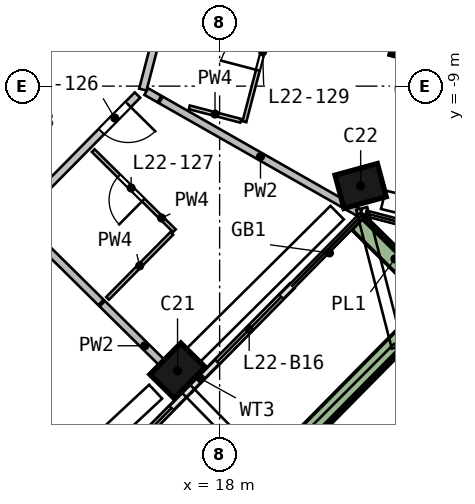
"""IFC4 building model, lengths in metres.
Left out: names, types, materials, properties, quantities, classifications, styles, units other than length and angle.
Written with IfcOpenShell. Run it as: python <this file> out.ifc"""

import sys

from ifc_helpers import new_model, si_unit, direction, frame, frame_2d, origin, origin_2d, place, context, subcontext, project, spatial, rectangle, extrude, element, fill, save


model = new_model("IFC4")
c1 = context("Model", 3, precision=1e-05, world=origin(), true_north=direction((0.0, 1.0)))
c2 = subcontext(c1, "Body", "Model", "MODEL_VIEW")
j1 = project(units=[si_unit("LENGTHUNIT", "METRE"), si_unit("PLANEANGLEUNIT", "RADIAN")], contexts=[c1])
p1 = place(None, origin())
s1 = spatial("IfcSite", under=j1, at=p1, CompositionType="ELEMENT")
p2 = place(p1, origin())
s2 = spatial("IfcBuilding", under=s1, at=p2, CompositionType="ELEMENT")
p3 = place(p2, frame((0.0, 0.0, 96.5)))
s3 = spatial("IfcBuildingStorey", under=s2, at=p3, CompositionType="ELEMENT", Elevation=96.5)
p4 = place(p3, frame((16.798, -16.588, 0.0), z_axis=(0.078255888, 0.080537401, 0.993674868), x_axis=(0.698489901, 0.706754906, -0.112291409)))
e1 = element("IfcColumn", 1, at=p4, inside=s3, PredefinedType="COLUMN", context=c2, shape_type="SweptSolid", body=[
    extrude(rectangle(XDim=1.15, YDim=0.9, at=origin_2d()), origin(), (0.0, 0.0, 1.0), 3.21),
])
p5 = place(p3, frame((21.644, -11.752, 0.0), z_axis=(0.055029299, 0.103445961, 0.99311163), x_axis=(-0.962932337, -0.257549594, 0.080184296)))
e2 = element("IfcColumn", 2, at=p5, inside=s3, PredefinedType="COLUMN", context=c2, shape_type="SweptSolid", body=[
    extrude(rectangle(XDim=1.15, YDim=0.9, at=origin_2d()), origin(), (0.0, 0.0, 1.0), 3.212),
])
p6 = place(p3, frame((22.989, -7.976, 0.0), z_axis=(0.036946061, 0.109621851, 0.993286484), x_axis=(0.967389364, -0.253166219, -0.008042671)))
e3 = element("IfcColumn", 3, at=p6, inside=s3, PredefinedType="COLUMN", context=c2, shape_type="SweptSolid", body=[
    extrude(rectangle(XDim=0.9, YDim=0.9, at=origin_2d()), origin(), (0.0, 0.0, 1.0), 3.211),
])
p7 = place(p3, frame((5.516, -13.717, 0.0), z_axis=(0.0, 0.0, 1.0), x_axis=(0.707106781, 0.707106781, 0.0)))
e4 = element("IfcWall", 4, at=p7, inside=s3, PredefinedType="SHEAR", context=c2, shape_type="SweptSolid", body=[
    extrude(rectangle(XDim=11.598, YDim=0.8, at=frame_2d((5.799, 0.0))), origin(), (0.0, 0.0, 1.0), 3.5),
])
p8 = place(p7, frame((2.099, 0.0, 0.0)))
e5 = element("IfcOpeningElement", 5, at=p8, cuts=e4, PredefinedType="OPENING", context=c2, shape_type="SweptSolid", body=[
    extrude(rectangle(XDim=1.2, YDim=2.1, at=frame_2d((0.6, 1.05))), frame((0.0, 0.41, 0.0), z_axis=(0.0, -1.0, 0.0), x_axis=(1.0, 0.0, 0.0)), (0.0, 0.0, 1.0), 0.82),
])
p9 = place(p3, frame((14.766, -19.465, 0.0), z_axis=(0.0, 0.0, 1.0), x_axis=(0.702631444, 0.711553971, 0.0)))
e6 = element("IfcWall", 6, at=p9, inside=s3, PredefinedType="SOLIDWALL", context=c2, shape_type="SweptSolid", body=[
    extrude(rectangle(XDim=3.475, YDim=0.15, at=frame_2d((1.738, 0.0))), origin(), (0.0, 0.0, 1.0), 2.425),
])
p10 = place(p9, frame((0.4, 0.0, 0.0)))
e7 = element("IfcOpeningElement", 7, at=p10, cuts=e6, PredefinedType="OPENING", context=c2, shape_type="SweptSolid", body=[
    extrude(rectangle(XDim=2.4, YDim=2.4, at=frame_2d((1.2, 1.2))), frame((0.0, 0.085, 0.0), z_axis=(0.0, -1.0, 0.0), x_axis=(1.0, 0.0, 0.0)), (0.0, 0.0, 1.0), 0.17),
])
p11 = place(p3, frame((17.207, -16.992, 0.0), z_axis=(0.0, 0.0, 1.0), x_axis=(0.702669036, 0.711516848, 0.0)))
e8 = element("IfcWall", 8, at=p11, inside=s3, PredefinedType="SOLIDWALL", context=c2, shape_type="SweptSolid", body=[
    extrude(rectangle(XDim=3.835, YDim=0.15, at=frame_2d((1.918, 0.0))), origin(), (0.0, 0.0, 1.0), 2.425),
])
p12 = place(p11, frame((1.035, 0.0, 0.0)))
e9 = element("IfcOpeningElement", 9, at=p12, cuts=e8, PredefinedType="OPENING", context=c2, shape_type="SweptSolid", body=[
    extrude(rectangle(XDim=2.4, YDim=2.4, at=frame_2d((1.2, 1.2))), frame((0.0, 0.085, 0.0), z_axis=(0.0, -1.0, 0.0), x_axis=(1.0, 0.0, 0.0)), (0.0, 0.0, 1.0), 0.17),
])
p13 = place(p3, frame((14.284, -24.258, 0.0), z_axis=(0.0, 0.0, 1.0), x_axis=(0.702654229, 0.711531471, 0.0)))
e10 = element("IfcWall", 10, at=p13, inside=s3, PredefinedType="SOLIDWALL", context=c2, shape_type="SweptSolid", body=[
    extrude(rectangle(XDim=13.723, YDim=0.5, at=frame_2d((6.862, 0.0))), origin(), (0.0, 0.0, 1.0), 0.7),
])
p14 = place(p3, frame((23.573, -14.495, 0.0), z_axis=(0.0, 0.0, 1.0), x_axis=(-0.71156988, 0.702615333, 0.0)))
e11 = element("IfcWall", 11, at=p14, inside=s3, PredefinedType="SOLIDWALL", context=c2, shape_type="SweptSolid", body=[
    extrude(rectangle(XDim=2.699, YDim=0.5, at=frame_2d((1.35, 0.0))), origin(), (0.0, 0.0, 1.0), 0.7),
])
p15 = place(p3, frame((15.839, -9.235, 0.0), z_axis=(0.0, 0.0, 1.0), x_axis=(-0.702660587, -0.711525192, 0.0)))
e12 = element("IfcWall", 12, at=p15, inside=s3, PredefinedType="SOLIDWALL", context=c2, shape_type="SweptSolid", body=[
    extrude(rectangle(XDim=9.116, YDim=0.2, at=frame_2d((4.558, 0.0))), origin(), (0.0, 0.0, 1.0), 3.19),
])
p16 = place(p15, frame((0.35, 0.0, 0.0)))
e13 = element("IfcOpeningElement", 13, at=p16, cuts=e12, PredefinedType="OPENING", context=c2, shape_type="SweptSolid", body=[
    extrude(rectangle(XDim=1.0, YDim=2.1, at=frame_2d((0.5, 1.05))), frame((0.0, 0.11, 0.0), z_axis=(0.0, -1.0, 0.0), x_axis=(1.0, 0.0, 0.0)), (0.0, 0.0, 1.0), 0.22),
])
p17 = place(p3, frame((15.979, -9.092, 0.0), z_axis=(0.0, 0.0, 1.0), x_axis=(0.25277502, 0.967525084, 0.0)))
e14 = element("IfcWall", 14, at=p17, inside=s3, PredefinedType="SOLIDWALL", context=c2, shape_type="SweptSolid", body=[
    extrude(rectangle(XDim=3.659, YDim=0.2, at=frame_2d((1.829, 0.0))), origin(), (0.0, 0.0, 1.0), 3.19),
])
p18 = place(p3, frame((12.954, -12.792, 0.0), z_axis=(0.0, 0.0, 1.0), x_axis=(0.711560793, -0.702624535, 0.0)))
e15 = element("IfcWall", 15, at=p18, inside=s3, PredefinedType="SOLIDWALL", context=c2, shape_type="SweptSolid", body=[
    extrude(rectangle(XDim=2.705, YDim=0.2, at=frame_2d((1.352, 0.0))), origin(), (0.0, 0.0, 1.0), 3.19),
])
p19 = place(p3, frame((14.911, -14.725, 0.0), z_axis=(0.0, 0.0, 1.0), x_axis=(0.711546698, -0.702638809, 0.0)))
e16 = element("IfcWall", 16, at=p19, inside=s3, PredefinedType="SOLIDWALL", context=c2, shape_type="SweptSolid", body=[
    extrude(rectangle(XDim=3.152, YDim=0.2, at=frame_2d((1.576, 0.0))), origin(), (0.0, 0.0, 1.0), 3.19),
])
p20 = place(p3, frame((16.069, -9.143, 0.0), z_axis=(0.0, 0.0, 1.0), x_axis=(0.869064731, -0.494698386, 0.0)))
e17 = element("IfcWall", 17, at=p20, inside=s3, PredefinedType="SOLIDWALL", context=c2, shape_type="SweptSolid", body=[
    extrude(rectangle(XDim=0.402, YDim=0.2, at=frame_2d((0.201, 0.0))), origin(), (0.0, 0.0, 1.0), 3.19),
])
p21 = place(p3, frame((16.453, -9.362, 0.0), z_axis=(0.0, 0.0, 1.0), x_axis=(0.869145541, -0.494556396, 0.0)))
e18 = element("IfcWall", 18, at=p21, inside=s3, PredefinedType="SOLIDWALL", context=c2, shape_type="SweptSolid", body=[
    extrude(rectangle(XDim=6.034, YDim=0.2, at=frame_2d((3.017, 0.0))), origin(), (0.0, 0.0, 1.0), 3.19),
])
p22 = place(p3, frame((16.81, -12.805, 0.0), z_axis=(0.0, 0.0, 1.0), x_axis=(-0.711568401, 0.702616831, 0.0)))
e19 = element("IfcWall", 19, at=p22, inside=s3, PredefinedType="PARTITIONING", context=c2, shape_type="SweptSolid", body=[
    extrude(rectangle(XDim=3.0, YDim=0.1, at=frame_2d((1.5, 0.0))), origin(), (0.0, 0.0, 1.0), 3.19),
])
p23 = place(p22, frame((1.15, 0.0, 0.0)))
e20 = element("IfcOpeningElement", 20, at=p23, cuts=e19, PredefinedType="OPENING", context=c2, shape_type="SweptSolid", body=[
    extrude(rectangle(XDim=0.9, YDim=2.1, at=frame_2d((0.45, 1.05))), frame((0.0, 0.06, 0.0), z_axis=(0.0, -1.0, 0.0), x_axis=(1.0, 0.0, 0.0)), (0.0, 0.0, 1.0), 0.12),
])
p24 = place(p3, frame((16.74, -12.876, 0.0), z_axis=(0.0, 0.0, 1.0), x_axis=(-0.702719059, -0.711467444, 0.0)))
e21 = element("IfcWall", 21, at=p24, inside=s3, PredefinedType="PARTITIONING", context=c2, shape_type="SweptSolid", body=[
    extrude(rectangle(XDim=2.4, YDim=0.1, at=frame_2d((1.2, 0.0))), origin(), (0.0, 0.0, 1.0), 3.19),
])
p25 = place(p3, frame((18.556, -9.912, 0.0), z_axis=(0.0, 0.0, 1.0), x_axis=(-0.96753195, 0.25274874, 0.0)))
e22 = element("IfcWall", 22, at=p25, inside=s3, PredefinedType="PARTITIONING", context=c2, shape_type="SweptSolid", body=[
    extrude(rectangle(XDim=1.399, YDim=0.1, at=frame_2d((0.699, 0.0))), origin(), (0.0, 0.0, 1.0), 3.19),
])
p26 = place(p3, frame((18.652, -9.937, 0.0), z_axis=(0.0, 0.0, 1.0), x_axis=(0.2527504, 0.967531516, 0.0)))
e23 = element("IfcWall", 23, at=p26, inside=s3, PredefinedType="PARTITIONING", context=c2, shape_type="SweptSolid", body=[
    extrude(rectangle(XDim=3.6, YDim=0.1, at=frame_2d((1.8, 0.0))), origin(), (0.0, 0.0, 1.0), 3.19),
])
p27 = place(p26, frame((1.4, 0.0, 0.0)))
e24 = element("IfcOpeningElement", 24, at=p27, cuts=e23, PredefinedType="OPENING", context=c2, shape_type="SweptSolid", body=[
    extrude(rectangle(XDim=1.0, YDim=2.1, at=frame_2d((0.5, 1.05))), frame((0.0, 0.06, 0.0), z_axis=(0.0, -1.0, 0.0), x_axis=(1.0, 0.0, 0.0)), (0.0, 0.0, 1.0), 0.12),
])
p28 = place(p10, origin())
e25 = element("IfcDoor", 25, at=p28, inside=s3, OperationType="SLIDING_TO_RIGHT", PredefinedType="DOOR", context=c2, shape_type="SweptSolid", body=[
    extrude(rectangle(XDim=2.4, YDim=2.4, at=frame_2d((1.2, 1.2))), frame((0.0, 0.025, 0.0), z_axis=(0.0, -1.0, 0.0), x_axis=(1.0, 0.0, 0.0)), (0.0, 0.0, 1.0), 0.05),
])
fill(e7, e25)
p29 = place(p12, origin())
e26 = element("IfcDoor", 26, at=p29, inside=s3, OperationType="SLIDING_TO_LEFT", PredefinedType="DOOR", context=c2, shape_type="SweptSolid", body=[
    extrude(rectangle(XDim=2.4, YDim=2.4, at=frame_2d((1.2, 1.2))), frame((0.0, 0.025, 0.0), z_axis=(0.0, -1.0, 0.0), x_axis=(1.0, 0.0, 0.0)), (0.0, 0.0, 1.0), 0.05),
])
fill(e9, e26)
p30 = place(p16, origin())
e27 = element("IfcDoor", 27, at=p30, inside=s3, OperationType="SINGLE_SWING_LEFT", PredefinedType="DOOR", context=c2, shape_type="SweptSolid", body=[
    extrude(rectangle(XDim=1.0, YDim=2.1, at=frame_2d((0.5, 1.05))), frame((0.0, 0.025, 0.0), z_axis=(0.0, -1.0, 0.0), x_axis=(1.0, 0.0, 0.0)), (0.0, 0.0, 1.0), 0.05),
])
fill(e13, e27)
p31 = place(p23, origin())
e28 = element("IfcDoor", 28, at=p31, inside=s3, OperationType="SINGLE_SWING_LEFT", PredefinedType="DOOR", context=c2, shape_type="SweptSolid", body=[
    extrude(rectangle(XDim=0.9, YDim=2.1, at=frame_2d((0.45, 1.05))), frame((0.0, 0.025, 0.0), z_axis=(0.0, -1.0, 0.0), x_axis=(1.0, 0.0, 0.0)), (0.0, 0.0, 1.0), 0.05),
])
fill(e20, e28)
p32 = place(p27, origin())
e29 = element("IfcDoor", 29, at=p32, inside=s3, OperationType="SINGLE_SWING_LEFT", PredefinedType="DOOR", context=c2, shape_type="SweptSolid", body=[
    extrude(rectangle(XDim=1.0, YDim=2.1, at=frame_2d((0.5, 1.05))), frame((0.0, 0.025, 0.0), z_axis=(0.0, -1.0, 0.0), x_axis=(1.0, 0.0, 0.0)), (0.0, 0.0, 1.0), 0.05),
])
fill(e24, e29)
save(model, sys.argv[1])
